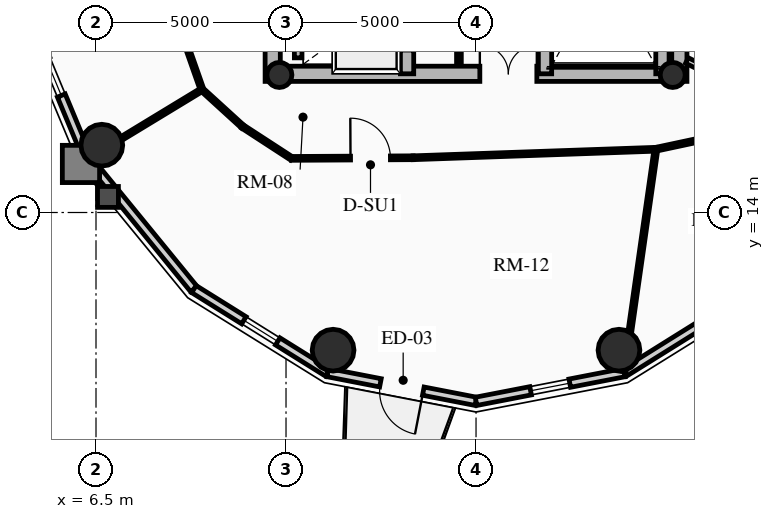
"""IFC4 building model, lengths in metres.
Left out: names, types, materials, properties, quantities, classifications, styles, units other than length and angle.
Written with IfcOpenShell. Run it as: python <this file> out.ifc"""

import sys

from ifc_helpers import new_model, si_unit, direction, frame, frame_2d, origin, origin_2d, place, context, subcontext, project, spatial, rectangle, circle, hollow_circle, extrude, source, transform, mapped, element, fill, save


model = new_model("IFC4")
c1 = context("Model", 3, precision=1e-05, world=origin(), true_north=direction((0.0, 1.0)))
c2 = subcontext(c1, "Body", "Model", "MODEL_VIEW")
j1 = project(units=[si_unit("LENGTHUNIT", "METRE"), si_unit("PLANEANGLEUNIT", "RADIAN")], contexts=[c1])
p1 = place(None, origin())
s1 = spatial("IfcSite", under=j1, at=p1, CompositionType="ELEMENT")
p2 = place(p1, origin())
s2 = spatial("IfcBuilding", under=s1, at=p2, CompositionType="ELEMENT")
p3 = place(p2, frame((0.0, 0.0, 196.66)))
s3 = spatial("IfcBuildingStorey", under=s2, at=p3, CompositionType="ELEMENT", Elevation=196.66)
for number, where, z_axis, x_axis in (
    (1, (11.15, 17.45, 0.0), (0.0, 0.0, 1.0), (0.0, 1.0, 0.0)),
    (2, (21.85, 17.45, 0.0), (0.0, 0.0, 1.0), (0.0, 1.0, 0.0)),
):
    element("IfcWall", number, at=place(p3, frame(where, z_axis=z_axis, x_axis=x_axis)), inside=s3, PredefinedType="SHEAR", context=c2, shape_type="SweptSolid", body=[
        extrude(rectangle(XDim=14.1, YDim=0.4, at=frame_2d((7.05, 0.0))), origin(), (0.0, 0.0, 1.0), 2.91),
    ])
p4 = place(p3, frame((11.15, 17.65, 0.0), z_axis=(0.0, 0.0, 1.0), x_axis=(1.0, 0.0, 0.0)))
e3 = element("IfcWall", 3, at=p4, inside=s3, PredefinedType="SHEAR", context=c2, shape_type="SweptSolid", body=[
    extrude(rectangle(XDim=10.7, YDim=0.4, at=frame_2d((5.35, 0.0))), origin(), (0.0, 0.0, 1.0), 2.91),
])
m1 = source(origin(), c2, "Body", "SweptSolid", [
    extrude(rectangle(XDim=1.5, YDim=2.02, at=frame_2d((0.75, 1.01))), frame((0.0, 0.21, 0.0), z_axis=(0.0, -1.0, 0.0), x_axis=(1.0, 0.0, 0.0)), (0.0, 0.0, 1.0), 0.42),
])
p5 = place(p4, frame((5.45, 0.0, 0.0)))
e4 = element("IfcOpeningElement", 4, at=p5, cuts=e3, PredefinedType="OPENING", context=c2, shape_type="MappedRepresentation", body=[
    mapped(m1, transform((0.0, 0.0, 0.0), x_axis=(1.0, 0.0, 0.0), y_axis=(0.0, 1.0, 0.0), z_axis=(0.0, 0.0, 1.0), scale=1.0)),
])
p6 = place(p3, frame((14.685, 17.65, 0.0), z_axis=(0.0, 0.0, 1.0), x_axis=(0.0, 1.0, 0.0)))
e5 = element("IfcWall", 5, at=p6, inside=s3, PredefinedType="SHEAR", context=c2, shape_type="SweptSolid", body=[
    extrude(rectangle(XDim=13.7, YDim=0.35, at=frame_2d((6.85, 0.0))), origin(), (0.0, 0.0, 1.0), 2.91),
])
m2 = source(origin(), c2, "Body", "SweptSolid", [
    extrude(rectangle(XDim=1.1, YDim=2.015, at=frame_2d((0.55, 1.007))), frame((0.0, 0.185, 0.0), z_axis=(0.0, -1.0, 0.0), x_axis=(1.0, 0.0, 0.0)), (0.0, 0.0, 1.0), 0.37),
])
p7 = place(p6, frame((4.85, 0.0, 0.0)))
e6 = element("IfcOpeningElement", 6, at=p7, cuts=e5, PredefinedType="OPENING", context=c2, shape_type="MappedRepresentation", body=[
    mapped(m2, transform((0.0, 0.0, 0.0), x_axis=(1.0, 0.0, 0.0), y_axis=(0.0, 1.0, 0.0), z_axis=(0.0, 0.0, 1.0), scale=1.0)),
])
p8 = place(p6, frame((0.625, 0.0, 0.0)))
e7 = element("IfcOpeningElement", 7, at=p8, cuts=e5, PredefinedType="OPENING", context=c2, shape_type="MappedRepresentation", body=[
    mapped(m2, transform((0.0, 0.0, 0.0), x_axis=(1.0, 0.0, 0.0), y_axis=(0.0, 1.0, 0.0), z_axis=(0.0, 0.0, 1.0), scale=1.0)),
])
p9 = place(p6, frame((2.625, 0.0, 0.0)))
e8 = element("IfcOpeningElement", 8, at=p9, cuts=e5, PredefinedType="OPENING", context=c2, shape_type="MappedRepresentation", body=[
    mapped(m2, transform((0.0, 0.0, 0.0), x_axis=(1.0, 0.0, 0.0), y_axis=(0.0, 1.0, 0.0), z_axis=(0.0, 0.0, 1.0), scale=1.0)),
])
m3 = source(origin(), c2, "Body", "SweptSolid", [
    extrude(rectangle(XDim=1.15, YDim=2.02, at=frame_2d((0.575, 1.01))), frame((0.0, 0.185, 0.0), z_axis=(0.0, -1.0, 0.0), x_axis=(1.0, 0.0, 0.0)), (0.0, 0.0, 1.0), 0.37),
])
p10 = place(p6, frame((7.27, 0.0, 0.0)))
e9 = element("IfcOpeningElement", 9, at=p10, cuts=e5, PredefinedType="OPENING", context=c2, shape_type="MappedRepresentation", body=[
    mapped(m3, transform((0.0, 0.0, 0.0), x_axis=(1.0, 0.0, 0.0), y_axis=(0.0, 1.0, 0.0), z_axis=(0.0, 0.0, 1.0), scale=1.0)),
])
p11 = place(p3, frame((18.315, 17.65, 0.0), z_axis=(0.0, 0.0, 1.0), x_axis=(0.0, 1.0, 0.0)))
e10 = element("IfcWall", 10, at=p11, inside=s3, PredefinedType="SHEAR", context=c2, shape_type="SweptSolid", body=[
    extrude(rectangle(XDim=9.6, YDim=0.35, at=frame_2d((4.8, 0.0))), origin(), (0.0, 0.0, 1.0), 2.91),
])
p12 = place(p11, frame((5.28, 0.0, 0.0)))
e11 = element("IfcOpeningElement", 11, at=p12, cuts=e10, PredefinedType="OPENING", context=c2, shape_type="MappedRepresentation", body=[
    mapped(m3, transform((0.0, 0.0, 0.0), x_axis=(1.0, 0.0, 0.0), y_axis=(0.0, 1.0, 0.0), z_axis=(0.0, 0.0, 1.0), scale=1.0)),
])
p13 = place(p3, frame((21.405, 17.65, 0.0), z_axis=(0.0, 0.0, 1.0), x_axis=(0.0, 1.0, 0.0)))
e12 = element("IfcWall", 12, at=p13, inside=s3, PredefinedType="SHEAR", context=c2, shape_type="SweptSolid", body=[
    extrude(rectangle(XDim=6.695, YDim=0.35, at=frame_2d((3.348, 0.0))), origin(), (0.0, 0.0, 1.0), 2.91),
])
for number, where, z_axis, x_axis in (
    (13, (11.325, 17.62, 0.0), (0.0, 0.0, 1.0), (1.0, 0.0, 0.0)),
    (14, (21.675, 17.62, 0.0), (0.0, 0.0, 1.0), (1.0, 0.0, 0.0)),
):
    element("IfcColumn", number, at=place(p3, frame(where, z_axis=z_axis, x_axis=x_axis)), inside=s3, PredefinedType="COLUMN", context=c2, shape_type="SweptSolid", body=[
        extrude(hollow_circle(Radius=0.33, WallThickness=0.025, at=origin_2d()), origin(), (0.0, 0.0, 1.0), 2.91),
    ])
for number, where, z_axis, x_axis in (
    (15, (6.653, 15.771, 0.0), (0.0, 0.0, 1.0), (1.0, 0.0, 0.0)),
    (16, (12.739, 10.377, 0.0), (0.0, 0.0, 1.0), (1.0, 0.0, 0.0)),
    (17, (20.261, 10.377, 0.0), (0.0, 0.0, 1.0), (1.0, 0.0, 0.0)),
):
    element("IfcColumn", number, at=place(p3, frame(where, z_axis=z_axis, x_axis=x_axis)), inside=s3, PredefinedType="USERDEFINED", context=c2, shape_type="SweptSolid", body=[
        extrude(circle(Radius=0.55, at=origin_2d()), origin(), (0.0, 0.0, 1.0), 2.91),
    ])
p14 = place(p3, frame((6.282, 15.407, 0.0), z_axis=(0.0, 0.0, 1.0), x_axis=(-0.384036305194, 0.923317993052, 0.0)))
e18 = element("IfcWall", 18, at=p14, inside=s3, PredefinedType="SOLIDWALL", context=c2, shape_type="SweptSolid", body=[
    extrude(rectangle(XDim=4.671, YDim=0.22, at=frame_2d((2.335, 0.0))), origin(), (0.0, 0.0, 1.0), 2.322),
])
m4 = source(origin(), c2, "Body", "SweptSolid", [
    extrude(rectangle(XDim=1.05, YDim=1.3, at=frame_2d((0.525, 0.65))), frame((0.0, 0.12, 0.0), z_axis=(0.0, -1.0, 0.0), x_axis=(1.0, 0.0, 0.0)), (0.0, 0.0, 1.0), 0.24),
])
p15 = place(p14, frame((1.81, 0.0, 0.65)))
e19 = element("IfcOpeningElement", 19, at=p15, cuts=e18, PredefinedType="OPENING", context=c2, shape_type="MappedRepresentation", body=[
    mapped(m4, transform((0.0, 0.0, 0.0), x_axis=(1.0, 0.0, 0.0), y_axis=(0.0, 1.0, 0.0), z_axis=(0.0, 0.0, 1.0), scale=1.0)),
])
p16 = place(p3, frame((9.076, 11.985, 0.0), z_axis=(0.0, 0.0, 1.0), x_axis=(-0.632467166636, 0.774587169483, 0.0)))
e20 = element("IfcWall", 20, at=p16, inside=s3, PredefinedType="SOLIDWALL", context=c2, shape_type="SweptSolid", body=[
    extrude(rectangle(XDim=4.418, YDim=0.22, at=frame_2d((2.209, 0.0))), origin(), (0.0, 0.0, 1.0), 2.322),
])
p17 = place(p3, frame((12.597, 9.787, 0.0), z_axis=(0.0, 0.0, 1.0), x_axis=(-0.848318713376, 0.529485939886, 0.0)))
e21 = element("IfcWall", 21, at=p17, inside=s3, PredefinedType="SOLIDWALL", context=c2, shape_type="SweptSolid", body=[
    extrude(rectangle(XDim=4.15, YDim=0.22, at=frame_2d((2.075, 0.0))), origin(), (0.0, 0.0, 1.0), 2.322),
])
p18 = place(p17, frame((1.55, 0.0, 0.65)))
e22 = element("IfcOpeningElement", 22, at=p18, cuts=e21, PredefinedType="OPENING", context=c2, shape_type="MappedRepresentation", body=[
    mapped(m4, transform((0.0, 0.0, 0.0), x_axis=(1.0, 0.0, 0.0), y_axis=(0.0, 1.0, 0.0), z_axis=(0.0, 0.0, 1.0), scale=1.0)),
])
p19 = place(p3, frame((16.5, 9.03, 0.0), z_axis=(0.0, 0.0, 1.0), x_axis=(-0.981700307484, 0.190432419211, 0.0)))
e23 = element("IfcWall", 23, at=p19, inside=s3, PredefinedType="SOLIDWALL", context=c2, shape_type="SweptSolid", body=[
    extrude(rectangle(XDim=3.976, YDim=0.22, at=frame_2d((1.988, 0.0))), origin(), (0.0, 0.0, 1.0), 2.322),
])
m5 = source(origin(), c2, "Body", "SweptSolid", [
    extrude(rectangle(XDim=1.15, YDim=2.005, at=frame_2d((0.575, 1.002))), frame((0.0, 0.12, 0.0), z_axis=(0.0, -1.0, 0.0), x_axis=(1.0, 0.0, 0.0)), (0.0, 0.0, 1.0), 0.24),
])
p20 = place(p19, frame((1.413, 0.0, 0.0)))
e24 = element("IfcOpeningElement", 24, at=p20, cuts=e23, PredefinedType="OPENING", context=c2, shape_type="MappedRepresentation", body=[
    mapped(m5, transform((0.0, 0.0, 0.0), x_axis=(1.0, 0.0, 0.0), y_axis=(0.0, 1.0, 0.0), z_axis=(0.0, 0.0, 1.0), scale=1.0)),
])
p21 = place(p3, frame((20.403, 9.787, 0.0), z_axis=(0.0, 0.0, 1.0), x_axis=(-0.981700307484, -0.190432419211, 0.0)))
e25 = element("IfcWall", 25, at=p21, inside=s3, PredefinedType="SOLIDWALL", context=c2, shape_type="SweptSolid", body=[
    extrude(rectangle(XDim=3.976, YDim=0.22, at=frame_2d((1.988, 0.0))), origin(), (0.0, 0.0, 1.0), 2.322),
])
p22 = place(p21, frame((1.463, 0.0, 0.65)))
e26 = element("IfcOpeningElement", 26, at=p22, cuts=e25, PredefinedType="OPENING", context=c2, shape_type="MappedRepresentation", body=[
    mapped(m4, transform((0.0, 0.0, 0.0), x_axis=(1.0, 0.0, 0.0), y_axis=(0.0, 1.0, 0.0), z_axis=(0.0, 0.0, 1.0), scale=1.0)),
])
p23 = place(p3, frame((23.924, 11.985, 0.0), z_axis=(0.0, 0.0, 1.0), x_axis=(-0.848318713376, -0.529485939886, 0.0)))
e27 = element("IfcWall", 27, at=p23, inside=s3, PredefinedType="SOLIDWALL", context=c2, shape_type="SweptSolid", body=[
    extrude(rectangle(XDim=4.15, YDim=0.22, at=frame_2d((2.075, 0.0))), origin(), (0.0, 0.0, 1.0), 2.322),
])
p24 = place(p3, frame((11.82, 18.07, 0.0), z_axis=(0.0, 0.0, 1.0), x_axis=(0.0, 1.0, 0.0)))
e28 = element("IfcWall", 28, at=p24, inside=s3, PredefinedType="SHEAR", context=c2, shape_type="SweptSolid", body=[
    extrude(rectangle(XDim=1.635, YDim=0.2, at=frame_2d((0.817, 0.0))), origin(), (0.0, 0.0, 1.0), 2.91),
])
p25 = place(p3, frame((16.05, 17.92, 0.0), z_axis=(0.0, 0.0, 1.0), x_axis=(0.0, 1.0, 0.0)))
e29 = element("IfcWall", 29, at=p25, inside=s3, PredefinedType="PARTITIONING", context=c2, shape_type="SweptSolid", body=[
    extrude(rectangle(XDim=1.8, YDim=0.125, at=frame_2d((0.9, 0.0))), origin(), (0.0, 0.0, 1.0), 2.685),
])
m6 = source(origin(), c2, "Body", "SweptSolid", [
    extrude(rectangle(XDim=0.9, YDim=2.005, at=frame_2d((0.45, 1.002))), frame((0.0, 0.073, 0.0), z_axis=(0.0, -1.0, 0.0), x_axis=(1.0, 0.0, 0.0)), (0.0, 0.0, 1.0), 0.145),
])
p26 = place(p25, frame((0.42, 0.0, 0.0)))
e30 = element("IfcOpeningElement", 30, at=p26, cuts=e29, PredefinedType="OPENING", context=c2, shape_type="MappedRepresentation", body=[
    mapped(m6, transform((0.0, 0.0, 0.0), x_axis=(1.0, 0.0, 0.0), y_axis=(0.0, 1.0, 0.0), z_axis=(0.0, 0.0, 1.0), scale=1.0)),
])
p27 = place(p3, frame((8.832, 18.534, 0.0), z_axis=(0.0, 0.0, 1.0), x_axis=(0.332031819657, -0.943268186008, 0.0)))
e31 = element("IfcWall", 31, at=p27, inside=s3, PredefinedType="MOVABLE", context=c2, shape_type="SweptSolid", body=[
    extrude(rectangle(XDim=1.377, YDim=0.1, at=frame_2d((0.688, 0.0))), origin(), (0.0, 0.0, 1.0), 2.255),
])
p28 = place(p3, frame((9.289, 17.235, 0.0), z_axis=(0.0, 0.0, 1.0), x_axis=(0.739015164946, -0.673688790155, 0.0)))
e32 = element("IfcWall", 32, at=p28, inside=s3, PredefinedType="MOVABLE", context=c2, shape_type="SweptSolid", body=[
    extrude(rectangle(XDim=1.446, YDim=0.1, at=frame_2d((0.723, 0.0))), origin(), (0.0, 0.0, 1.0), 2.322),
])
p29 = place(p3, frame((10.358, 16.26, 0.0), z_axis=(0.0, 0.0, 1.0), x_axis=(0.838265397059, -0.545262435983, 0.0)))
e33 = element("IfcWall", 33, at=p29, inside=s3, PredefinedType="MOVABLE", context=c2, shape_type="SweptSolid", body=[
    extrude(rectangle(XDim=1.534, YDim=0.1, at=frame_2d((0.767, 0.0))), origin(), (0.0, 0.0, 1.0), 2.255),
])
p30 = place(p3, frame((11.644, 15.424, 0.0), z_axis=(0.0, 0.0, 1.0), x_axis=(0.999986552511, 0.005186019339, 0.0)))
e34 = element("IfcWall", 34, at=p30, inside=s3, PredefinedType="MOVABLE", context=c2, shape_type="SweptSolid", body=[
    extrude(rectangle(XDim=3.201, YDim=0.1, at=frame_2d((1.601, 0.0))), origin(), (0.0, 0.0, 1.0), 2.322),
])
m7 = source(origin(), c2, "Body", "SweptSolid", [
    extrude(rectangle(XDim=1.05, YDim=2.015, at=frame_2d((0.525, 1.007))), frame((0.0, 0.06, 0.0), z_axis=(0.0, -1.0, 0.0), x_axis=(1.0, 0.0, 0.0)), (0.0, 0.0, 1.0), 0.12),
])
p31 = place(p30, frame((1.553, 0.0, 0.0)))
e35 = element("IfcOpeningElement", 35, at=p31, cuts=e34, PredefinedType="OPENING", context=c2, shape_type="MappedRepresentation", body=[
    mapped(m7, transform((0.0, 0.0, 0.0), x_axis=(1.0, 0.0, 0.0), y_axis=(0.0, 1.0, 0.0), z_axis=(0.0, 0.0, 1.0), scale=1.0)),
])
p32 = place(p3, frame((14.845, 15.441, 0.0), z_axis=(0.0, 0.0, 1.0), x_axis=(0.99938794868, 0.034981824334, 0.0)))
e36 = element("IfcWall", 36, at=p32, inside=s3, PredefinedType="MOVABLE", context=c2, shape_type="SweptSolid", body=[
    extrude(rectangle(XDim=6.393, YDim=0.1, at=frame_2d((3.196, 0.0))), origin(), (0.0, 0.0, 1.0), 2.255),
])
p33 = place(p3, frame((21.234, 15.664, 0.0), z_axis=(0.0, 0.0, 1.0), x_axis=(0.977931581182, 0.208925399431, 0.0)))
e37 = element("IfcWall", 37, at=p33, inside=s3, PredefinedType="MOVABLE", context=c2, shape_type="SweptSolid", body=[
    extrude(rectangle(XDim=1.823, YDim=0.1, at=frame_2d((0.912, 0.0))), origin(), (0.0, 0.0, 1.0), 2.255),
])
p34 = place(p3, frame((9.289, 17.235, 0.0), z_axis=(0.0, 0.0, 1.0), x_axis=(-0.854741081983, -0.519054604806, 0.0)))
e38 = element("IfcWall", 38, at=p34, inside=s3, PredefinedType="MOVABLE", context=c2, shape_type="SweptSolid", body=[
    extrude(rectangle(XDim=3.499, YDim=0.1, at=frame_2d((1.75, 0.0))), origin(), (0.0, 0.0, 1.0), 2.322),
])
p35 = place(p3, frame((21.234, 15.664, 0.0), z_axis=(0.0, 0.0, 1.0), x_axis=(-0.141467563045, -0.989942891588, 0.0)))
e39 = element("IfcWall", 39, at=p35, inside=s3, PredefinedType="MOVABLE", context=c2, shape_type="SweptSolid", body=[
    extrude(rectangle(XDim=5.918, YDim=0.1, at=frame_2d((2.959, 0.0))), origin(), (0.0, 0.0, 1.0), 2.322),
])
p36 = place(p3, frame((22.05, 18.0, 0.0), z_axis=(0.0, 0.0, 1.0), x_axis=(0.896045848613, -0.443961526692, 0.0)))
e40 = element("IfcWall", 40, at=p36, inside=s3, PredefinedType="PARTITIONING", context=c2, shape_type="SweptSolid", body=[
    extrude(rectangle(XDim=1.924, YDim=0.16, at=frame_2d((0.962, 0.0))), origin(), (0.0, 0.0, 1.0), 2.255),
])
m8 = source(origin(), c2, "Body", "SweptSolid", [
    extrude(rectangle(XDim=1.05, YDim=2.015, at=frame_2d((0.525, 1.007))), frame((0.0, 0.09, 0.0), z_axis=(0.0, -1.0, 0.0), x_axis=(1.0, 0.0, 0.0)), (0.0, 0.0, 1.0), 0.18),
])
p37 = place(p36, frame((0.674, 0.0, 0.0)))
e41 = element("IfcOpeningElement", 41, at=p37, cuts=e40, PredefinedType="OPENING", context=c2, shape_type="MappedRepresentation", body=[
    mapped(m8, transform((0.0, 0.0, 0.0), x_axis=(1.0, 0.0, 0.0), y_axis=(0.0, 1.0, 0.0), z_axis=(0.0, 0.0, 1.0), scale=1.0)),
])
m9 = source(origin(), c2, "Body", "SweptSolid", [
    extrude(rectangle(XDim=1.05, YDim=1.3, at=frame_2d((0.525, 0.65))), frame((0.0, 0.03, 0.0), z_axis=(0.0, -1.0, 0.0), x_axis=(1.0, 0.0, 0.0)), (0.0, 0.0, 1.0), 0.06),
])
p38 = place(p15, origin())
e42 = element("IfcWindow", 42, at=p38, inside=s3, PartitioningType="SINGLE_PANEL", PredefinedType="WINDOW", context=c2, shape_type="MappedRepresentation", body=[
    mapped(m9, transform((0.0, 0.0, 0.0), x_axis=(1.0, 0.0, 0.0), y_axis=(0.0, 1.0, 0.0), z_axis=(0.0, 0.0, 1.0), scale=1.0)),
])
fill(e19, e42)
p39 = place(p18, origin())
e43 = element("IfcWindow", 43, at=p39, inside=s3, PartitioningType="SINGLE_PANEL", PredefinedType="WINDOW", context=c2, shape_type="MappedRepresentation", body=[
    mapped(m9, transform((0.0, 0.0, 0.0), x_axis=(1.0, 0.0, 0.0), y_axis=(0.0, 1.0, 0.0), z_axis=(0.0, 0.0, 1.0), scale=1.0)),
])
fill(e22, e43)
m10 = source(origin(), c2, "Body", "SweptSolid", [
    extrude(rectangle(XDim=1.15, YDim=2.005, at=frame_2d((0.575, 1.002))), frame((0.0, 0.025, 0.0), z_axis=(0.0, -1.0, 0.0), x_axis=(1.0, 0.0, 0.0)), (0.0, 0.0, 1.0), 0.05),
])
p40 = place(p20, origin())
e44 = element("IfcDoor", 44, at=p40, inside=s3, OperationType="SINGLE_SWING_LEFT", PredefinedType="DOOR", context=c2, shape_type="MappedRepresentation", body=[
    mapped(m10, transform((0.0, 0.0, 0.0), x_axis=(1.0, 0.0, 0.0), y_axis=(0.0, 1.0, 0.0), z_axis=(0.0, 0.0, 1.0), scale=1.0)),
])
fill(e24, e44)
p41 = place(p22, origin())
e45 = element("IfcWindow", 45, at=p41, inside=s3, PartitioningType="SINGLE_PANEL", PredefinedType="WINDOW", context=c2, shape_type="MappedRepresentation", body=[
    mapped(m9, transform((0.0, 0.0, 0.0), x_axis=(1.0, 0.0, 0.0), y_axis=(0.0, 1.0, 0.0), z_axis=(0.0, 0.0, 1.0), scale=1.0)),
])
fill(e26, e45)
m11 = source(origin(), c2, "Body", "SweptSolid", [
    extrude(rectangle(XDim=1.5, YDim=2.02, at=frame_2d((0.75, 1.01))), frame((0.0, 0.025, 0.0), z_axis=(0.0, -1.0, 0.0), x_axis=(1.0, 0.0, 0.0)), (0.0, 0.0, 1.0), 0.05),
])
p42 = place(p5, origin())
e46 = element("IfcDoor", 46, at=p42, inside=s3, OperationType="DOUBLE_DOOR_SINGLE_SWING", PredefinedType="DOOR", context=c2, shape_type="MappedRepresentation", body=[
    mapped(m11, transform((0.0, 0.0, 0.0), x_axis=(1.0, 0.0, 0.0), y_axis=(0.0, 1.0, 0.0), z_axis=(0.0, 0.0, 1.0), scale=1.0)),
])
fill(e4, e46)
m12 = source(origin(), c2, "Body", "SweptSolid", [
    extrude(rectangle(XDim=1.05, YDim=2.015, at=frame_2d((0.525, 1.007))), frame((0.0, 0.025, 0.0), z_axis=(0.0, -1.0, 0.0), x_axis=(1.0, 0.0, 0.0)), (0.0, 0.0, 1.0), 0.05),
])
p43 = place(p31, origin())
e47 = element("IfcDoor", 47, at=p43, inside=s3, OperationType="SINGLE_SWING_LEFT", PredefinedType="DOOR", context=c2, shape_type="MappedRepresentation", body=[
    mapped(m12, transform((0.0, 0.0, 0.0), x_axis=(1.0, 0.0, 0.0), y_axis=(0.0, 1.0, 0.0), z_axis=(0.0, 0.0, 1.0), scale=1.0)),
])
fill(e35, e47)
save(model, sys.argv[1])
